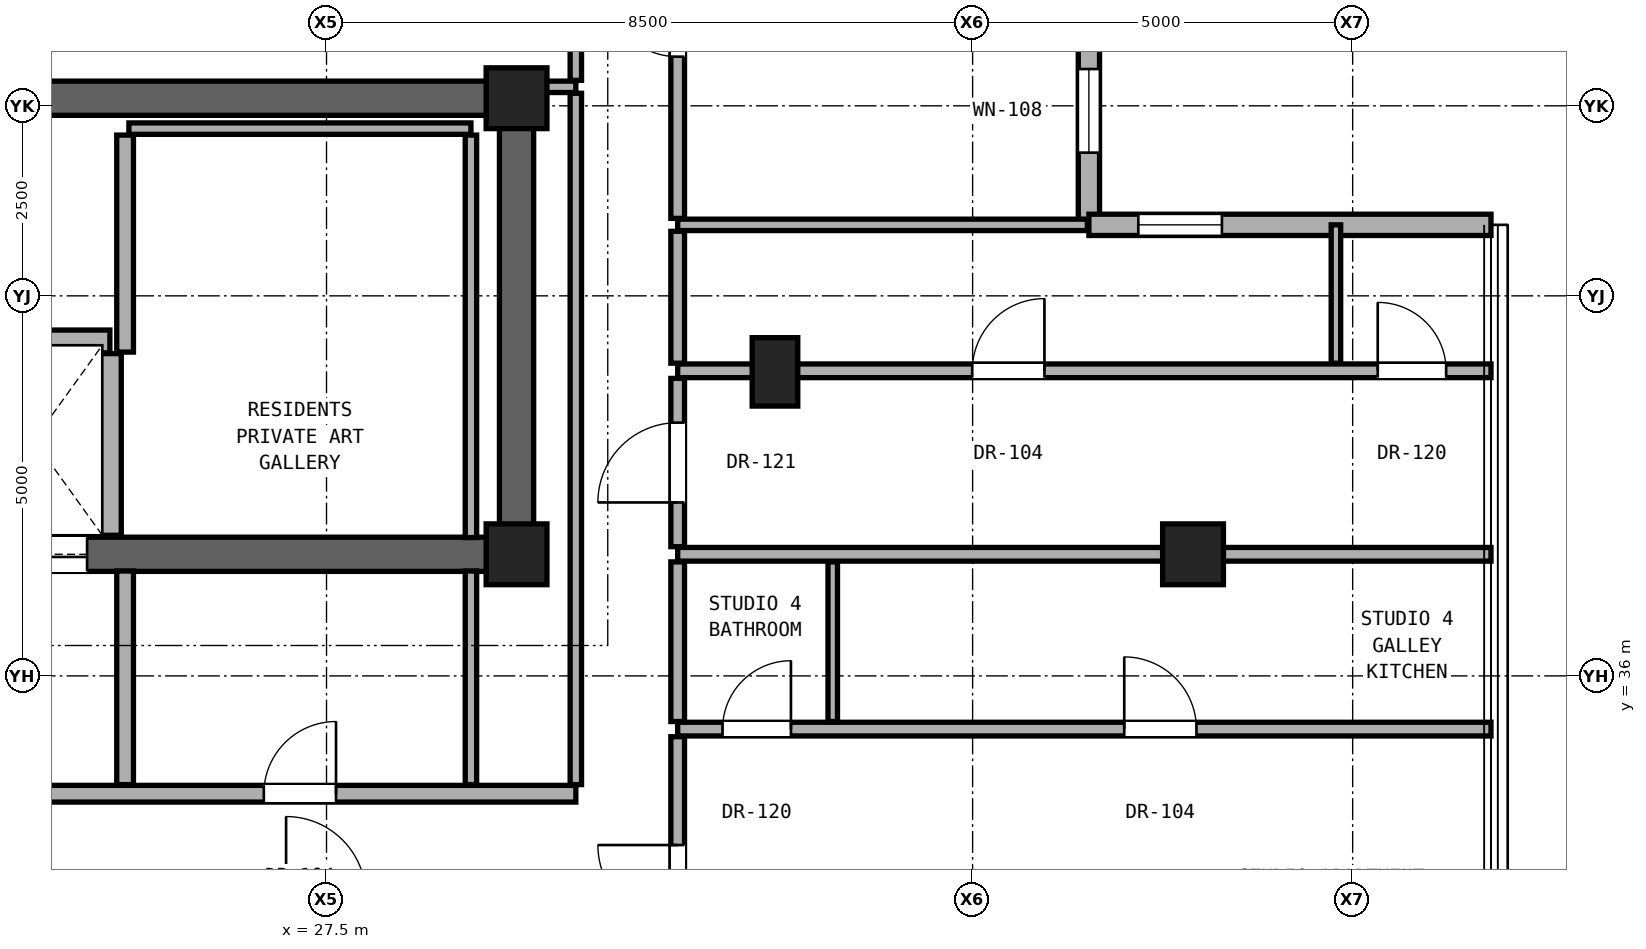
"""IFC4 building model, lengths in metres.
Left out: names, types, materials, properties, quantities, classifications, styles, units other than length and angle.
Written with IfcOpenShell. Run it as: python <this file> out.ifc"""

import sys

from ifc_helpers import new_model, si_unit, direction, frame, frame_2d, origin, origin_2d, place, context, subcontext, project, spatial, rectangle, hollow_rectangle, extrude, element, fill, save


model = new_model("IFC4")
c1 = context("Model", 3, precision=1e-05, world=origin(), true_north=direction((0.0, 1.0)))
c2 = subcontext(c1, "Body", "Model", "MODEL_VIEW")
j1 = project(units=[si_unit("LENGTHUNIT", "METRE"), si_unit("PLANEANGLEUNIT", "RADIAN")], contexts=[c1])
p1 = place(None, origin())
s1 = spatial("IfcSite", under=j1, at=p1, CompositionType="ELEMENT")
p2 = place(p1, origin())
s2 = spatial("IfcBuilding", under=s1, at=p2, CompositionType="ELEMENT")
p3 = place(p2, frame((0.0, 0.0, 245.8)))
s3 = spatial("IfcBuildingStorey", under=s2, at=p3, CompositionType="ELEMENT", Elevation=245.8)
for number, where, z_axis, x_axis in (
    (1, (30.0, 37.6, 0.0), (0.0, 0.0, 1.0), (1.0, 0.0, 0.0)),
    (2, (30.0, 43.6, 0.0), (0.0, 0.0, 1.0), (1.0, 0.0, 0.0)),
):
    element("IfcColumn", number, at=place(p3, frame(where, z_axis=z_axis, x_axis=x_axis)), inside=s3, PredefinedType="COLUMN", context=c2, shape_type="SweptSolid", body=[
        extrude(rectangle(XDim=0.8, YDim=0.8, at=origin_2d()), origin(), (0.0, 0.0, 1.0), 3.3),
    ])
p4 = place(p3, frame((38.9, 37.6, 0.0), z_axis=(0.0, 0.0, 1.0), x_axis=(1.0, 0.0, 0.0)))
e3 = element("IfcColumn", 3, at=p4, inside=s3, PredefinedType="COLUMN", context=c2, shape_type="SweptSolid", body=[
    extrude(hollow_rectangle(XDim=0.8, YDim=0.8, WallThickness=0.045, at=origin_2d()), origin(), (0.0, 0.0, 1.0), 3.3),
])
p5 = place(p3, frame((33.4, 40.0, 0.0), z_axis=(0.0, 0.0, 1.0), x_axis=(1.0, 0.0, 0.0)))
e4 = element("IfcColumn", 4, at=p5, inside=s3, PredefinedType="PILASTER", context=c2, shape_type="SweptSolid", body=[
    extrude(rectangle(XDim=0.6, YDim=0.9, at=origin_2d()), origin(), (0.0, 0.0, 1.0), 3.3),
])
p6 = place(p3, frame((11.0, 43.6, 0.0), z_axis=(0.0, 0.0, 1.0), x_axis=(1.0, 0.0, 0.0)))
e5 = element("IfcWall", 5, at=p6, inside=s3, PredefinedType="SHEAR", context=c2, shape_type="SweptSolid", body=[
    extrude(rectangle(XDim=19.0, YDim=0.45, at=frame_2d((9.5, 0.0))), origin(), (0.0, 0.0, 1.0), 3.1),
])
p7 = place(p3, frame((30.0, 37.6, 0.0), z_axis=(0.0, 0.0, 1.0), x_axis=(0.0, 1.0, 0.0)))
e6 = element("IfcWall", 6, at=p7, inside=s3, PredefinedType="SHEAR", context=c2, shape_type="SweptSolid", body=[
    extrude(rectangle(XDim=6.0, YDim=0.45, at=frame_2d((3.0, 0.0))), origin(), (0.0, 0.0, 1.0), 3.1),
])
p8 = place(p3, frame((11.0, 37.6, 0.0), z_axis=(0.0, 0.0, 1.0), x_axis=(1.0, 0.0, 0.0)))
e7 = element("IfcWall", 7, at=p8, inside=s3, PredefinedType="SHEAR", context=c2, shape_type="SweptSolid", body=[
    extrude(rectangle(XDim=19.0, YDim=0.45, at=frame_2d((9.5, 0.0))), origin(), (0.0, 0.0, 1.0), 3.1),
])
p9 = place(p8, frame((1.06, 0.0, 0.0)))
e8 = element("IfcOpeningElement", 8, at=p9, cuts=e7, PredefinedType="OPENING", context=c2, shape_type="SweptSolid", body=[
    extrude(rectangle(XDim=1.15, YDim=2.2, at=frame_2d((0.575, 1.1))), frame((0.0, 0.235, 0.0), z_axis=(0.0, -1.0, 0.0), x_axis=(1.0, 0.0, 0.0)), (0.0, 0.0, 1.0), 0.47),
])
p10 = place(p8, frame((9.55, 0.0, 0.0)))
e9 = element("IfcOpeningElement", 9, at=p10, cuts=e7, PredefinedType="OPENING", context=c2, shape_type="SweptSolid", body=[
    extrude(rectangle(XDim=1.4, YDim=2.35, at=frame_2d((0.7, 1.175))), frame((0.0, 0.235, 0.0), z_axis=(0.0, -1.0, 0.0), x_axis=(1.0, 0.0, 0.0)), (0.0, 0.0, 1.0), 0.47),
])
p11 = place(p8, frame((11.95, 0.0, 0.0)))
e10 = element("IfcOpeningElement", 10, at=p11, cuts=e7, PredefinedType="OPENING", context=c2, shape_type="SweptSolid", body=[
    extrude(rectangle(XDim=1.4, YDim=2.35, at=frame_2d((0.7, 1.175))), frame((0.0, 0.235, 0.0), z_axis=(0.0, -1.0, 0.0), x_axis=(1.0, 0.0, 0.0)), (0.0, 0.0, 1.0), 0.47),
])
p12 = place(p3, frame((37.53, 41.934, 0.0), z_axis=(0.0, 0.0, 1.0), x_axis=(0.0, 1.0, 0.0)))
e11 = element("IfcWall", 11, at=p12, inside=s3, PredefinedType="SOLIDWALL", context=c2, shape_type="SweptSolid", body=[
    extrude(rectangle(XDim=5.29, YDim=0.28, at=frame_2d((2.645, 0.0))), origin(), (0.0, 0.0, 1.0), 3.08),
])
p13 = place(p12, frame((0.95, 0.0, 0.85)))
e12 = element("IfcOpeningElement", 12, at=p13, cuts=e11, PredefinedType="OPENING", context=c2, shape_type="SweptSolid", body=[
    extrude(rectangle(XDim=1.1, YDim=2.0, at=frame_2d((0.55, 1.0))), frame((0.0, 0.15, 0.0), z_axis=(0.0, -1.0, 0.0), x_axis=(1.0, 0.0, 0.0)), (0.0, 0.0, 1.0), 0.3),
])
p14 = place(p3, frame((42.82, 41.934, 0.0), z_axis=(0.0, 0.0, 1.0), x_axis=(-1.0, 0.0, 0.0)))
e13 = element("IfcWall", 13, at=p14, inside=s3, PredefinedType="SOLIDWALL", context=c2, shape_type="SweptSolid", body=[
    extrude(rectangle(XDim=5.29, YDim=0.28, at=frame_2d((2.645, 0.0))), origin(), (0.0, 0.0, 1.0), 3.08),
])
p15 = place(p14, frame((3.54, 0.0, 0.85)))
e14 = element("IfcOpeningElement", 14, at=p15, cuts=e13, PredefinedType="OPENING", context=c2, shape_type="SweptSolid", body=[
    extrude(rectangle(XDim=1.1, YDim=2.0, at=frame_2d((0.55, 1.0))), frame((0.0, 0.15, 0.0), z_axis=(0.0, -1.0, 0.0), x_axis=(1.0, 0.0, 0.0)), (0.0, 0.0, 1.0), 0.3),
])
p16 = place(p3, frame((15.59, 34.45, 0.0), z_axis=(0.0, 0.0, 1.0), x_axis=(1.0, 0.0, 0.0)))
e15 = element("IfcWall", 15, at=p16, inside=s3, PredefinedType="SOLIDWALL", context=c2, shape_type="SweptSolid", body=[
    extrude(rectangle(XDim=15.19, YDim=0.22, at=frame_2d((7.595, 0.0))), origin(), (0.0, 0.0, 1.0), 2.236),
])
p17 = place(p16, frame((6.435, 0.0, 0.0)))
e16 = element("IfcOpeningElement", 16, at=p17, cuts=e15, PredefinedType="OPENING", context=c2, shape_type="SweptSolid", body=[
    extrude(rectangle(XDim=0.85, YDim=2.01, at=frame_2d((0.425, 1.005))), frame((0.0, 0.12, 0.0), z_axis=(0.0, -1.0, 0.0), x_axis=(1.0, 0.0, 0.0)), (0.0, 0.0, 1.0), 0.24),
])
p18 = place(p16, frame((11.085, 0.0, 0.0)))
e17 = element("IfcOpeningElement", 17, at=p18, cuts=e15, PredefinedType="OPENING", context=c2, shape_type="SweptSolid", body=[
    extrude(rectangle(XDim=0.95, YDim=2.15, at=frame_2d((0.475, 1.075))), frame((0.0, 0.12, 0.0), z_axis=(0.0, -1.0, 0.0), x_axis=(1.0, 0.0, 0.0)), (0.0, 0.0, 1.0), 0.24),
])
p19 = place(p16, frame((1.775, 0.0, 0.0)))
e18 = element("IfcOpeningElement", 18, at=p19, cuts=e15, PredefinedType="OPENING", context=c2, shape_type="SweptSolid", body=[
    extrude(rectangle(XDim=0.85, YDim=2.01, at=frame_2d((0.425, 1.005))), frame((0.0, 0.12, 0.0), z_axis=(0.0, -1.0, 0.0), x_axis=(1.0, 0.0, 0.0)), (0.0, 0.0, 1.0), 0.24),
])
p20 = place(p3, frame((32.12, 35.3, 0.0), z_axis=(0.0, 0.0, 1.0), x_axis=(1.0, 0.0, 0.0)))
e19 = element("IfcWall", 19, at=p20, inside=s3, PredefinedType="PARTITIONING", context=c2, shape_type="SweptSolid", body=[
    extrude(rectangle(XDim=10.7, YDim=0.18, at=frame_2d((5.35, 0.0))), origin(), (0.0, 0.0, 1.0), 2.319),
])
p21 = place(p20, frame((5.875, 0.0, 0.0)))
e20 = element("IfcOpeningElement", 20, at=p21, cuts=e19, PredefinedType="OPENING", context=c2, shape_type="SweptSolid", body=[
    extrude(rectangle(XDim=0.95, YDim=2.15, at=frame_2d((0.475, 1.075))), frame((0.0, 0.1, 0.0), z_axis=(0.0, -1.0, 0.0), x_axis=(1.0, 0.0, 0.0)), (0.0, 0.0, 1.0), 0.2),
])
p22 = place(p20, frame((0.59, 0.0, 0.0)))
e21 = element("IfcOpeningElement", 21, at=p22, cuts=e19, PredefinedType="OPENING", context=c2, shape_type="SweptSolid", body=[
    extrude(rectangle(XDim=0.9, YDim=2.1, at=frame_2d((0.45, 1.05))), frame((0.0, 0.1, 0.0), z_axis=(0.0, -1.0, 0.0), x_axis=(1.0, 0.0, 0.0)), (0.0, 0.0, 1.0), 0.2),
])
p23 = place(p3, frame((32.12, 37.6, 0.0), z_axis=(0.0, 0.0, 1.0), x_axis=(1.0, 0.0, 0.0)))
e22 = element("IfcWall", 22, at=p23, inside=s3, PredefinedType="PARTITIONING", context=c2, shape_type="SweptSolid", body=[
    extrude(rectangle(XDim=10.7, YDim=0.18, at=frame_2d((5.35, 0.0))), origin(), (0.0, 0.0, 1.0), 2.319),
])
p24 = place(p3, frame((32.12, 40.014, 0.0), z_axis=(0.0, 0.0, 1.0), x_axis=(1.0, 0.0, 0.0)))
e23 = element("IfcWall", 23, at=p24, inside=s3, PredefinedType="PARTITIONING", context=c2, shape_type="SweptSolid", body=[
    extrude(rectangle(XDim=10.7, YDim=0.18, at=frame_2d((5.35, 0.0))), origin(), (0.0, 0.0, 1.0), 2.543),
])
p25 = place(p24, frame((3.875, 0.0, 0.0)))
e24 = element("IfcOpeningElement", 24, at=p25, cuts=e23, PredefinedType="OPENING", context=c2, shape_type="SweptSolid", body=[
    extrude(rectangle(XDim=0.95, YDim=2.15, at=frame_2d((0.475, 1.075))), frame((0.0, 0.1, 0.0), z_axis=(0.0, -1.0, 0.0), x_axis=(1.0, 0.0, 0.0)), (0.0, 0.0, 1.0), 0.2),
])
p26 = place(p24, frame((9.21, 0.0, 0.0)))
e25 = element("IfcOpeningElement", 25, at=p26, cuts=e23, PredefinedType="OPENING", context=c2, shape_type="SweptSolid", body=[
    extrude(rectangle(XDim=0.9, YDim=2.1, at=frame_2d((0.45, 1.05))), frame((0.0, 0.1, 0.0), z_axis=(0.0, -1.0, 0.0), x_axis=(1.0, 0.0, 0.0)), (0.0, 0.0, 1.0), 0.2),
])
p27 = place(p3, frame((20.25, 40.4, 0.0), z_axis=(0.0, 0.0, 1.0), x_axis=(1.0, 0.0, 0.0)))
e26 = element("IfcWall", 26, at=p27, inside=s3, PredefinedType="SOLIDWALL", context=c2, shape_type="SweptSolid", body=[
    extrude(rectangle(XDim=4.4, YDim=0.3, at=frame_2d((2.2, 0.0))), origin(), (0.0, 0.0, 1.0), 3.1),
])
p28 = place(p3, frame((32.12, 41.934, 0.0), z_axis=(0.0, 0.0, 1.0), x_axis=(1.0, 0.0, 0.0)))
e27 = element("IfcWall", 27, at=p28, inside=s3, PredefinedType="PARTITIONING", context=c2, shape_type="SweptSolid", body=[
    extrude(rectangle(XDim=5.39, YDim=0.15, at=frame_2d((2.695, 0.0))), origin(), (0.0, 0.0, 1.0), 3.1),
])
p29 = place(p3, frame((24.9, 43.2, 0.0), z_axis=(0.0, 0.0, 1.0), x_axis=(1.0, 0.0, 0.0)))
e28 = element("IfcWall", 28, at=p29, inside=s3, PredefinedType="PARTITIONING", context=c2, shape_type="SweptSolid", body=[
    extrude(rectangle(XDim=4.5, YDim=0.15, at=frame_2d((2.25, 0.0))), origin(), (0.0, 0.0, 1.0), 3.1),
])
p30 = place(p3, frame((30.22, 43.75, 0.0), z_axis=(0.0, 0.0, 1.0), x_axis=(1.0, 0.0, 0.0)))
e29 = element("IfcWall", 29, at=p30, inside=s3, PredefinedType="PARTITIONING", context=c2, shape_type="SweptSolid", body=[
    extrude(rectangle(XDim=0.56, YDim=0.15, at=frame_2d((0.28, 0.0))), origin(), (0.0, 0.0, 1.0), 3.1),
])
p31 = place(p3, frame((24.65, 37.85, 0.0), z_axis=(0.0, 0.0, 1.0), x_axis=(0.0, 1.0, 0.0)))
e30 = element("IfcWall", 30, at=p31, inside=s3, PredefinedType="SOLIDWALL", context=c2, shape_type="SweptSolid", body=[
    extrude(rectangle(XDim=2.39, YDim=0.3, at=frame_2d((1.195, 0.0))), origin(), (0.0, 0.0, 1.0), 3.1),
])
p32 = place(p3, frame((24.85, 34.57, 0.0), z_axis=(0.0, 0.0, 1.0), x_axis=(0.0, 1.0, 0.0)))
e31 = element("IfcWall", 31, at=p32, inside=s3, PredefinedType="SOLIDWALL", context=c2, shape_type="SweptSolid", body=[
    extrude(rectangle(XDim=2.81, YDim=0.22, at=frame_2d((1.405, 0.0))), origin(), (0.0, 0.0, 1.0), 3.1),
])
p33 = place(p3, frame((24.85, 40.26, 0.0), z_axis=(0.0, 0.0, 1.0), x_axis=(0.0, 1.0, 0.0)))
e32 = element("IfcWall", 32, at=p33, inside=s3, PredefinedType="SOLIDWALL", context=c2, shape_type="SweptSolid", body=[
    extrude(rectangle(XDim=2.855, YDim=0.22, at=frame_2d((1.427, 0.0))), origin(), (0.0, 0.0, 1.0), 3.1),
])
p34 = place(p3, frame((29.4, 34.57, 0.0), z_axis=(0.0, 0.0, 1.0), x_axis=(0.0, 1.0, 0.0)))
e33 = element("IfcWall", 33, at=p34, inside=s3, PredefinedType="PARTITIONING", context=c2, shape_type="SweptSolid", body=[
    extrude(rectangle(XDim=2.81, YDim=0.15, at=frame_2d((1.405, 0.0))), origin(), (0.0, 0.0, 1.0), 3.1),
])
p35 = place(p3, frame((29.4, 37.82, 0.0), z_axis=(0.0, 0.0, 1.0), x_axis=(0.0, 1.0, 0.0)))
e34 = element("IfcWall", 34, at=p35, inside=s3, PredefinedType="PARTITIONING", context=c2, shape_type="SweptSolid", body=[
    extrude(rectangle(XDim=5.295, YDim=0.15, at=frame_2d((2.647, 0.0))), origin(), (0.0, 0.0, 1.0), 3.1),
])
p36 = place(p3, frame((30.78, 34.57, 0.0), z_axis=(0.0, 0.0, 1.0), x_axis=(0.0, 1.0, 0.0)))
e35 = element("IfcWall", 35, at=p36, inside=s3, PredefinedType="PARTITIONING", context=c2, shape_type="SweptSolid", body=[
    extrude(rectangle(XDim=9.095, YDim=0.15, at=frame_2d((4.547, 0.0))), origin(), (0.0, 0.0, 1.0), 2.492),
])
p37 = place(p3, frame((30.78, 43.835, 0.0), z_axis=(0.0, 0.0, 1.0), x_axis=(0.0, 1.0, 0.0)))
e36 = element("IfcWall", 36, at=p37, inside=s3, PredefinedType="PARTITIONING", context=c2, shape_type="SweptSolid", body=[
    extrude(rectangle(XDim=3.389, YDim=0.15, at=frame_2d((1.695, 0.0))), origin(), (0.0, 0.0, 1.0), 3.1),
])
p38 = place(p37, frame((1.169, 0.0, 0.0)))
e37 = element("IfcOpeningElement", 37, at=p38, cuts=e36, PredefinedType="OPENING", context=c2, shape_type="SweptSolid", body=[
    extrude(rectangle(XDim=1.05, YDim=2.2, at=frame_2d((0.525, 1.1))), frame((0.0, 0.085, 0.0), z_axis=(0.0, -1.0, 0.0), x_axis=(1.0, 0.0, 0.0)), (0.0, 0.0, 1.0), 0.17),
])
p39 = place(p3, frame((32.12, 31.3, 0.0), z_axis=(0.0, 0.0, 1.0), x_axis=(0.0, 1.0, 0.0)))
e38 = element("IfcWall", 38, at=p39, inside=s3, PredefinedType="PARTITIONING", context=c2, shape_type="SweptSolid", body=[
    extrude(rectangle(XDim=3.9, YDim=0.18, at=frame_2d((1.95, 0.0))), origin(), (0.0, 0.0, 1.0), 2.396),
])
p40 = place(p39, frame((1.425, 0.0, 0.0)))
e39 = element("IfcOpeningElement", 39, at=p40, cuts=e38, PredefinedType="OPENING", context=c2, shape_type="SweptSolid", body=[
    extrude(rectangle(XDim=1.05, YDim=2.2, at=frame_2d((0.525, 1.1))), frame((0.0, 0.1, 0.0), z_axis=(0.0, -1.0, 0.0), x_axis=(1.0, 0.0, 0.0)), (0.0, 0.0, 1.0), 0.2),
])
p41 = place(p3, frame((32.12, 35.4, 0.0), z_axis=(0.0, 0.0, 1.0), x_axis=(0.0, 1.0, 0.0)))
e40 = element("IfcWall", 40, at=p41, inside=s3, PredefinedType="PARTITIONING", context=c2, shape_type="SweptSolid", body=[
    extrude(rectangle(XDim=2.1, YDim=0.18, at=frame_2d((1.05, 0.0))), origin(), (0.0, 0.0, 1.0), 2.492),
])
p42 = place(p3, frame((32.12, 37.7, 0.0), z_axis=(0.0, 0.0, 1.0), x_axis=(0.0, 1.0, 0.0)))
e41 = element("IfcWall", 41, at=p42, inside=s3, PredefinedType="PARTITIONING", context=c2, shape_type="SweptSolid", body=[
    extrude(rectangle(XDim=2.214, YDim=0.18, at=frame_2d((1.107, 0.0))), origin(), (0.0, 0.0, 1.0), 2.492),
])
p43 = place(p42, frame((0.582, 0.0, 0.0)))
e42 = element("IfcOpeningElement", 42, at=p43, cuts=e41, PredefinedType="OPENING", context=c2, shape_type="SweptSolid", body=[
    extrude(rectangle(XDim=1.05, YDim=2.2, at=frame_2d((0.525, 1.1))), frame((0.0, 0.1, 0.0), z_axis=(0.0, -1.0, 0.0), x_axis=(1.0, 0.0, 0.0)), (0.0, 0.0, 1.0), 0.2),
])
p44 = place(p3, frame((32.12, 40.114, 0.0), z_axis=(0.0, 0.0, 1.0), x_axis=(0.0, 1.0, 0.0)))
e43 = element("IfcWall", 43, at=p44, inside=s3, PredefinedType="PARTITIONING", context=c2, shape_type="SweptSolid", body=[
    extrude(rectangle(XDim=1.735, YDim=0.18, at=frame_2d((0.868, 0.0))), origin(), (0.0, 0.0, 1.0), 3.1),
])
p45 = place(p3, frame((32.12, 42.019, 0.0), z_axis=(0.0, 0.0, 1.0), x_axis=(0.0, 1.0, 0.0)))
e44 = element("IfcWall", 44, at=p45, inside=s3, PredefinedType="PARTITIONING", context=c2, shape_type="SweptSolid", body=[
    extrude(rectangle(XDim=5.205, YDim=0.18, at=frame_2d((2.603, 0.0))), origin(), (0.0, 0.0, 1.0), 3.1),
])
p46 = place(p45, frame((2.127, 0.0, 0.0)))
e45 = element("IfcOpeningElement", 45, at=p46, cuts=e44, PredefinedType="OPENING", context=c2, shape_type="SweptSolid", body=[
    extrude(rectangle(XDim=0.95, YDim=2.15, at=frame_2d((0.475, 1.075))), frame((0.0, 0.1, 0.0), z_axis=(0.0, -1.0, 0.0), x_axis=(1.0, 0.0, 0.0)), (0.0, 0.0, 1.0), 0.2),
])
p47 = place(p3, frame((34.16, 35.4, 0.0), z_axis=(0.0, 0.0, 1.0), x_axis=(0.0, 1.0, 0.0)))
e46 = element("IfcWall", 46, at=p47, inside=s3, PredefinedType="PARTITIONING", context=c2, shape_type="SweptSolid", body=[
    extrude(rectangle(XDim=2.1, YDim=0.125, at=frame_2d((1.05, 0.0))), origin(), (0.0, 0.0, 1.0), 2.492),
])
p48 = place(p3, frame((40.78, 40.114, 0.0), z_axis=(0.0, 0.0, 1.0), x_axis=(0.0, 1.0, 0.0)))
e47 = element("IfcWall", 47, at=p48, inside=s3, PredefinedType="PARTITIONING", context=c2, shape_type="SweptSolid", body=[
    extrude(rectangle(XDim=1.82, YDim=0.125, at=frame_2d((0.91, 0.0))), origin(), (0.0, 0.0, 1.0), 3.1),
])
p49 = place(p13, origin())
e48 = element("IfcWindow", 48, at=p49, inside=s3, PartitioningType="SINGLE_PANEL", PredefinedType="WINDOW", context=c2, shape_type="SweptSolid", body=[
    extrude(rectangle(XDim=1.1, YDim=2.0, at=frame_2d((0.55, 1.0))), frame((0.0, 0.03, 0.0), z_axis=(0.0, -1.0, 0.0), x_axis=(1.0, 0.0, 0.0)), (0.0, 0.0, 1.0), 0.06),
])
fill(e12, e48)
p50 = place(p15, origin())
e49 = element("IfcWindow", 49, at=p50, inside=s3, PartitioningType="SINGLE_PANEL", PredefinedType="WINDOW", context=c2, shape_type="SweptSolid", body=[
    extrude(rectangle(XDim=1.1, YDim=2.0, at=frame_2d((0.55, 1.0))), frame((0.0, 0.03, 0.0), z_axis=(0.0, -1.0, 0.0), x_axis=(1.0, 0.0, 0.0)), (0.0, 0.0, 1.0), 0.06),
])
fill(e14, e49)
p51 = place(p18, origin())
e50 = element("IfcDoor", 50, at=p51, inside=s3, OperationType="SINGLE_SWING_RIGHT", PredefinedType="DOOR", context=c2, shape_type="SweptSolid", body=[
    extrude(rectangle(XDim=0.95, YDim=2.15, at=frame_2d((0.475, 1.075))), frame((0.0, 0.025, 0.0), z_axis=(0.0, -1.0, 0.0), x_axis=(1.0, 0.0, 0.0)), (0.0, 0.0, 1.0), 0.05),
])
fill(e17, e50)
p52 = place(p40, origin())
e51 = element("IfcDoor", 51, at=p52, inside=s3, OperationType="SINGLE_SWING_RIGHT", PredefinedType="DOOR", context=c2, shape_type="SweptSolid", body=[
    extrude(rectangle(XDim=1.05, YDim=2.2, at=frame_2d((0.525, 1.1))), frame((0.0, 0.025, 0.0), z_axis=(0.0, -1.0, 0.0), x_axis=(1.0, 0.0, 0.0)), (0.0, 0.0, 1.0), 0.05),
])
fill(e39, e51)
p53 = place(p21, origin())
e52 = element("IfcDoor", 52, at=p53, inside=s3, OperationType="SINGLE_SWING_LEFT", PredefinedType="DOOR", context=c2, shape_type="SweptSolid", body=[
    extrude(rectangle(XDim=0.95, YDim=2.15, at=frame_2d((0.475, 1.075))), frame((0.0, 0.025, 0.0), z_axis=(0.0, -1.0, 0.0), x_axis=(1.0, 0.0, 0.0)), (0.0, 0.0, 1.0), 0.05),
])
fill(e20, e52)
p54 = place(p22, origin())
e53 = element("IfcDoor", 53, at=p54, inside=s3, OperationType="SINGLE_SWING_RIGHT", PredefinedType="DOOR", context=c2, shape_type="SweptSolid", body=[
    extrude(rectangle(XDim=0.9, YDim=2.1, at=frame_2d((0.45, 1.05))), frame((0.0, 0.025, 0.0), z_axis=(0.0, -1.0, 0.0), x_axis=(1.0, 0.0, 0.0)), (0.0, 0.0, 1.0), 0.05),
])
fill(e21, e53)
p55 = place(p43, origin())
e54 = element("IfcDoor", 54, at=p55, inside=s3, OperationType="SINGLE_SWING_LEFT", PredefinedType="DOOR", context=c2, shape_type="SweptSolid", body=[
    extrude(rectangle(XDim=1.05, YDim=2.2, at=frame_2d((0.525, 1.1))), frame((0.0, 0.025, 0.0), z_axis=(0.0, -1.0, 0.0), x_axis=(1.0, 0.0, 0.0)), (0.0, 0.0, 1.0), 0.05),
])
fill(e42, e54)
p56 = place(p25, origin())
e55 = element("IfcDoor", 55, at=p56, inside=s3, OperationType="SINGLE_SWING_RIGHT", PredefinedType="DOOR", context=c2, shape_type="SweptSolid", body=[
    extrude(rectangle(XDim=0.95, YDim=2.15, at=frame_2d((0.475, 1.075))), frame((0.0, 0.025, 0.0), z_axis=(0.0, -1.0, 0.0), x_axis=(1.0, 0.0, 0.0)), (0.0, 0.0, 1.0), 0.05),
])
fill(e24, e55)
p57 = place(p26, origin())
e56 = element("IfcDoor", 56, at=p57, inside=s3, OperationType="SINGLE_SWING_LEFT", PredefinedType="DOOR", context=c2, shape_type="SweptSolid", body=[
    extrude(rectangle(XDim=0.9, YDim=2.1, at=frame_2d((0.45, 1.05))), frame((0.0, 0.025, 0.0), z_axis=(0.0, -1.0, 0.0), x_axis=(1.0, 0.0, 0.0)), (0.0, 0.0, 1.0), 0.05),
])
fill(e25, e56)
p58 = place(p46, origin())
e57 = element("IfcDoor", 57, at=p58, inside=s3, OperationType="SINGLE_SWING_RIGHT", PredefinedType="DOOR", context=c2, shape_type="SweptSolid", body=[
    extrude(rectangle(XDim=0.95, YDim=2.15, at=frame_2d((0.475, 1.075))), frame((0.0, 0.025, 0.0), z_axis=(0.0, -1.0, 0.0), x_axis=(1.0, 0.0, 0.0)), (0.0, 0.0, 1.0), 0.05),
])
fill(e45, e57)
p59 = place(p11, origin())
e58 = element("IfcDoor", 58, at=p59, inside=s3, OperationType="DOUBLE_DOOR_SLIDING", PredefinedType="DOOR", context=c2, shape_type="SweptSolid", body=[
    extrude(rectangle(XDim=1.4, YDim=2.35, at=frame_2d((0.7, 1.175))), frame((0.0, 0.025, 0.0), z_axis=(0.0, -1.0, 0.0), x_axis=(1.0, 0.0, 0.0)), (0.0, 0.0, 1.0), 0.05),
])
fill(e10, e58)
save(model, sys.argv[1])
